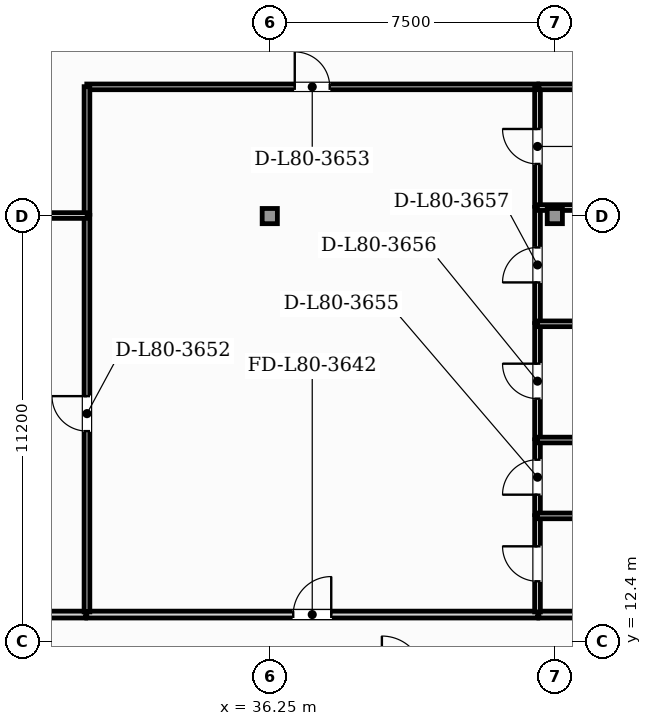
"""IFC4 building model, lengths in metres.
Left out: names, types, materials, properties, quantities, classifications, styles, units other than length and angle.
Written with IfcOpenShell. Run it as: python <this file> out.ifc"""

import sys

from ifc_helpers import new_model, si_unit, direction, frame, frame_2d, origin, origin_2d, place, context, subcontext, project, spatial, rectangle, hollow_rectangle, extrude, element, fill, save


model = new_model("IFC4")
c1 = context("Model", 3, precision=1e-05, world=origin(), true_north=direction((0.0, 1.0)))
c2 = subcontext(c1, "Body", "Model", "MODEL_VIEW")
j1 = project(units=[si_unit("LENGTHUNIT", "METRE"), si_unit("PLANEANGLEUNIT", "RADIAN")], contexts=[c1])
p1 = place(None, origin())
s1 = spatial("IfcSite", under=j1, at=p1, CompositionType="ELEMENT")
p2 = place(p1, origin())
s2 = spatial("IfcBuilding", under=s1, at=p2, CompositionType="ELEMENT")
p3 = place(p2, frame((0.0, 0.0, 324.6)))
s3 = spatial("IfcBuildingStorey", under=s2, at=p3, CompositionType="ELEMENT", Elevation=324.6)
for number, where, z_axis, x_axis in (
    (1, (36.25, 23.6, 0.0), (0.0, 0.0, 1.0), (1.0, 0.0, 0.0)),
    (2, (43.75, 23.6, 0.0), (0.0, 0.0, 1.0), (1.0, 0.0, 0.0)),
):
    element("IfcColumn", number, at=place(p3, frame(where, z_axis=z_axis, x_axis=x_axis)), inside=s3, PredefinedType="COLUMN", context=c2, shape_type="SweptSolid", body=[
        extrude(hollow_rectangle(XDim=0.4, YDim=0.4, WallThickness=0.02, at=origin_2d()), origin(), (0.0, 0.0, 1.0), 3.85),
    ])
p4 = place(p3, frame((31.435, 13.115, 0.0), z_axis=(0.0, 0.0, 1.0), x_axis=(1.0, 0.0, 0.0)))
e3 = element("IfcWall", 3, at=p4, inside=s3, PredefinedType="PARTITIONING", context=c2, shape_type="SweptSolid", body=[
    extrude(rectangle(XDim=11.865, YDim=0.18, at=frame_2d((5.932, 0.0))), origin(), (0.0, 0.0, 1.0), 3.65),
])
p5 = place(p4, frame((5.432, 0.0, 0.0)))
e4 = element("IfcOpeningElement", 4, at=p5, cuts=e3, PredefinedType="OPENING", context=c2, shape_type="SweptSolid", body=[
    extrude(rectangle(XDim=1.0, YDim=2.15, at=frame_2d((0.5, 1.075))), frame((0.0, 0.1, 0.0), z_axis=(0.0, -1.0, 0.0), x_axis=(1.0, 0.0, 0.0)), (0.0, 0.0, 1.0), 0.2),
])
p6 = place(p3, frame((26.095, 13.115, 0.0), z_axis=(0.0, 0.0, 1.0), x_axis=(1.0, 0.0, 0.0)))
e5 = element("IfcWall", 5, at=p6, inside=s3, PredefinedType="PARTITIONING", context=c2, shape_type="SweptSolid", body=[
    extrude(rectangle(XDim=5.31, YDim=0.18, at=frame_2d((2.655, 0.0))), origin(), (0.0, 0.0, 1.0), 3.65),
])
p7 = place(p6, frame((2.155, 0.0, 0.0)))
e6 = element("IfcOpeningElement", 6, at=p7, cuts=e5, PredefinedType="OPENING", context=c2, shape_type="SweptSolid", body=[
    extrude(rectangle(XDim=1.0, YDim=2.15, at=frame_2d((0.5, 1.075))), frame((0.0, 0.1, 0.0), z_axis=(0.0, -1.0, 0.0), x_axis=(1.0, 0.0, 0.0)), (0.0, 0.0, 1.0), 0.2),
])
p8 = place(p3, frame((43.33, 13.115, 0.0), z_axis=(0.0, 0.0, 1.0), x_axis=(1.0, 0.0, 0.0)))
e7 = element("IfcWall", 7, at=p8, inside=s3, PredefinedType="PARTITIONING", context=c2, shape_type="SweptSolid", body=[
    extrude(rectangle(XDim=3.065, YDim=0.18, at=frame_2d((1.533, 0.0))), origin(), (0.0, 0.0, 1.0), 3.65),
])
p9 = place(p3, frame((31.44, 13.185, 0.0), z_axis=(0.0, 0.0, 1.0), x_axis=(0.0, 1.0, 0.0)))
e8 = element("IfcWall", 8, at=p9, inside=s3, PredefinedType="PARTITIONING", context=c2, shape_type="SweptSolid", body=[
    extrude(rectangle(XDim=10.435, YDim=0.15, at=frame_2d((5.217, 0.0))), origin(), (0.0, 0.0, 1.0), 3.65),
])
p10 = place(p9, frame((4.757, 0.0, 0.0)))
e9 = element("IfcOpeningElement", 9, at=p10, cuts=e8, PredefinedType="OPENING", context=c2, shape_type="SweptSolid", body=[
    extrude(rectangle(XDim=0.92, YDim=2.1, at=frame_2d((0.46, 1.05))), frame((0.0, 0.085, 0.0), z_axis=(0.0, -1.0, 0.0), x_axis=(1.0, 0.0, 0.0)), (0.0, 0.0, 1.0), 0.17),
])
p11 = place(p3, frame((31.435, 27.0, 0.0), z_axis=(0.0, 0.0, 1.0), x_axis=(1.0, 0.0, 0.0)))
e10 = element("IfcWall", 10, at=p11, inside=s3, PredefinedType="PARTITIONING", context=c2, shape_type="SweptSolid", body=[
    extrude(rectangle(XDim=11.865, YDim=0.15, at=frame_2d((5.932, 0.0))), origin(), (0.0, 0.0, 1.0), 3.65),
])
p12 = place(p11, frame((5.472, 0.0, 0.0)))
e11 = element("IfcOpeningElement", 11, at=p12, cuts=e10, PredefinedType="OPENING", context=c2, shape_type="SweptSolid", body=[
    extrude(rectangle(XDim=0.92, YDim=2.1, at=frame_2d((0.46, 1.05))), frame((0.0, 0.085, 0.0), z_axis=(0.0, -1.0, 0.0), x_axis=(1.0, 0.0, 0.0)), (0.0, 0.0, 1.0), 0.17),
])
p13 = place(p3, frame((31.44, 23.65, 0.0), z_axis=(0.0, 0.0, 1.0), x_axis=(0.0, 1.0, 0.0)))
e12 = element("IfcWall", 12, at=p13, inside=s3, PredefinedType="PARTITIONING", context=c2, shape_type="SweptSolid", body=[
    extrude(rectangle(XDim=3.355, YDim=0.15, at=frame_2d((1.678, 0.0))), origin(), (0.0, 0.0, 1.0), 3.65),
])
p14 = place(p3, frame((43.295, 13.185, 0.0), z_axis=(0.0, 0.0, 1.0), x_axis=(0.0, 1.0, 0.0)))
e13 = element("IfcWall", 13, at=p14, inside=s3, PredefinedType="PARTITIONING", context=c2, shape_type="SweptSolid", body=[
    extrude(rectangle(XDim=2.531, YDim=0.15, at=frame_2d((1.266, 0.0))), origin(), (0.0, 0.0, 1.0), 3.65),
])
p15 = place(p14, frame((0.806, 0.0, 0.0)))
e14 = element("IfcOpeningElement", 14, at=p15, cuts=e13, PredefinedType="OPENING", context=c2, shape_type="SweptSolid", body=[
    extrude(rectangle(XDim=0.92, YDim=2.1, at=frame_2d((0.46, 1.05))), frame((0.0, 0.085, 0.0), z_axis=(0.0, -1.0, 0.0), x_axis=(1.0, 0.0, 0.0)), (0.0, 0.0, 1.0), 0.17),
])
p16 = place(p3, frame((43.295, 15.747, 0.0), z_axis=(0.0, 0.0, 1.0), x_axis=(0.0, 1.0, 0.0)))
e15 = element("IfcWall", 15, at=p16, inside=s3, PredefinedType="PARTITIONING", context=c2, shape_type="SweptSolid", body=[
    extrude(rectangle(XDim=1.966, YDim=0.15, at=frame_2d((0.983, 0.0))), origin(), (0.0, 0.0, 1.0), 3.65),
])
p17 = place(p16, frame((0.523, 0.0, 0.0)))
e16 = element("IfcOpeningElement", 16, at=p17, cuts=e15, PredefinedType="OPENING", context=c2, shape_type="SweptSolid", body=[
    extrude(rectangle(XDim=0.92, YDim=2.1, at=frame_2d((0.46, 1.05))), frame((0.0, 0.085, 0.0), z_axis=(0.0, -1.0, 0.0), x_axis=(1.0, 0.0, 0.0)), (0.0, 0.0, 1.0), 0.17),
])
p18 = place(p3, frame((43.295, 17.743, 0.0), z_axis=(0.0, 0.0, 1.0), x_axis=(0.0, 1.0, 0.0)))
e17 = element("IfcWall", 17, at=p18, inside=s3, PredefinedType="PARTITIONING", context=c2, shape_type="SweptSolid", body=[
    extrude(rectangle(XDim=3.028, YDim=0.15, at=frame_2d((1.514, 0.0))), origin(), (0.0, 0.0, 1.0), 3.65),
])
p19 = place(p18, frame((1.054, 0.0, 0.0)))
e18 = element("IfcOpeningElement", 18, at=p19, cuts=e17, PredefinedType="OPENING", context=c2, shape_type="SweptSolid", body=[
    extrude(rectangle(XDim=0.92, YDim=2.1, at=frame_2d((0.46, 1.05))), frame((0.0, 0.085, 0.0), z_axis=(0.0, -1.0, 0.0), x_axis=(1.0, 0.0, 0.0)), (0.0, 0.0, 1.0), 0.17),
])
p20 = place(p3, frame((43.295, 20.801, 0.0), z_axis=(0.0, 0.0, 1.0), x_axis=(0.0, 1.0, 0.0)))
e19 = element("IfcWall", 19, at=p20, inside=s3, PredefinedType="PARTITIONING", context=c2, shape_type="SweptSolid", body=[
    extrude(rectangle(XDim=3.028, YDim=0.15, at=frame_2d((1.514, 0.0))), origin(), (0.0, 0.0, 1.0), 3.65),
])
p21 = place(p20, frame((1.054, 0.0, 0.0)))
e20 = element("IfcOpeningElement", 20, at=p21, cuts=e19, PredefinedType="OPENING", context=c2, shape_type="SweptSolid", body=[
    extrude(rectangle(XDim=0.92, YDim=2.1, at=frame_2d((0.46, 1.05))), frame((0.0, 0.085, 0.0), z_axis=(0.0, -1.0, 0.0), x_axis=(1.0, 0.0, 0.0)), (0.0, 0.0, 1.0), 0.17),
])
p22 = place(p3, frame((43.295, 23.859, 0.0), z_axis=(0.0, 0.0, 1.0), x_axis=(0.0, 1.0, 0.0)))
e21 = element("IfcWall", 21, at=p22, inside=s3, PredefinedType="PARTITIONING", context=c2, shape_type="SweptSolid", body=[
    extrude(rectangle(XDim=3.146, YDim=0.15, at=frame_2d((1.573, 0.0))), origin(), (0.0, 0.0, 1.0), 3.65),
])
p23 = place(p22, frame((1.113, 0.0, 0.0)))
e22 = element("IfcOpeningElement", 22, at=p23, cuts=e21, PredefinedType="OPENING", context=c2, shape_type="SweptSolid", body=[
    extrude(rectangle(XDim=0.92, YDim=2.1, at=frame_2d((0.46, 1.05))), frame((0.0, 0.085, 0.0), z_axis=(0.0, -1.0, 0.0), x_axis=(1.0, 0.0, 0.0)), (0.0, 0.0, 1.0), 0.17),
])
p24 = place(p3, frame((26.055, 23.615, 0.0), z_axis=(0.0, 0.0, 1.0), x_axis=(1.0, 0.0, 0.0)))
e23 = element("IfcWall", 23, at=p24, inside=s3, PredefinedType="PARTITIONING", context=c2, shape_type="SweptSolid", body=[
    extrude(rectangle(XDim=5.39, YDim=0.15, at=frame_2d((2.695, 0.0))), origin(), (0.0, 0.0, 1.0), 3.117),
])
p25 = place(p24, frame((0.618, 0.0, 0.0)))
e24 = element("IfcOpeningElement", 24, at=p25, cuts=e23, PredefinedType="OPENING", context=c2, shape_type="SweptSolid", body=[
    extrude(rectangle(XDim=0.92, YDim=2.1, at=frame_2d((0.46, 1.05))), frame((0.0, 0.085, 0.0), z_axis=(0.0, -1.0, 0.0), x_axis=(1.0, 0.0, 0.0)), (0.0, 0.0, 1.0), 0.17),
])
p26 = place(p3, frame((43.33, 27.0, 0.0), z_axis=(0.0, 0.0, 1.0), x_axis=(1.0, 0.0, 0.0)))
e25 = element("IfcWall", 25, at=p26, inside=s3, PredefinedType="PARTITIONING", context=c2, shape_type="SweptSolid", body=[
    extrude(rectangle(XDim=4.885, YDim=0.15, at=frame_2d((2.443, 0.0))), origin(), (0.0, 0.0, 1.0), 3.65),
])
p27 = place(p26, frame((1.983, 0.0, 0.0)))
e26 = element("IfcOpeningElement", 26, at=p27, cuts=e25, PredefinedType="OPENING", context=c2, shape_type="SweptSolid", body=[
    extrude(rectangle(XDim=0.92, YDim=2.1, at=frame_2d((0.46, 1.05))), frame((0.0, 0.085, 0.0), z_axis=(0.0, -1.0, 0.0), x_axis=(1.0, 0.0, 0.0)), (0.0, 0.0, 1.0), 0.17),
])
for number, where, z_axis, x_axis in (
    (27, (43.29, 15.711, 0.0), (0.0, 0.0, 1.0), (1.0, 0.0, 0.0)),
    (28, (43.29, 17.708, 0.0), (0.0, 0.0, 1.0), (1.0, 0.0, 0.0)),
    (29, (43.29, 20.766, 0.0), (0.0, 0.0, 1.0), (1.0, 0.0, 0.0)),
    (30, (43.29, 23.823, 0.0), (0.0, 0.0, 1.0), (1.0, 0.0, 0.0)),
):
    element("IfcWall", number, at=place(p3, frame(where, z_axis=z_axis, x_axis=x_axis)), inside=s3, PredefinedType="PARTITIONING", context=c2, shape_type="SweptSolid", body=[
        extrude(rectangle(XDim=4.926, YDim=0.15, at=frame_2d((2.463, 0.0))), origin(), (0.0, 0.0, 1.0), 3.65),
    ])
p28 = place(p5, origin())
e31 = element("IfcDoor", 31, at=p28, inside=s3, OperationType="SINGLE_SWING_RIGHT", PredefinedType="DOOR", context=c2, shape_type="SweptSolid", body=[
    extrude(rectangle(XDim=1.0, YDim=2.15, at=frame_2d((0.5, 1.075))), frame((0.0, 0.025, 0.0), z_axis=(0.0, -1.0, 0.0), x_axis=(1.0, 0.0, 0.0)), (0.0, 0.0, 1.0), 0.05),
])
fill(e4, e31)
p29 = place(p10, origin())
e32 = element("IfcDoor", 32, at=p29, inside=s3, OperationType="SINGLE_SWING_RIGHT", PredefinedType="DOOR", context=c2, shape_type="SweptSolid", body=[
    extrude(rectangle(XDim=0.92, YDim=2.1, at=frame_2d((0.46, 1.05))), frame((0.0, 0.025, 0.0), z_axis=(0.0, -1.0, 0.0), x_axis=(1.0, 0.0, 0.0)), (0.0, 0.0, 1.0), 0.05),
])
fill(e9, e32)
p30 = place(p12, origin())
e33 = element("IfcDoor", 33, at=p30, inside=s3, OperationType="SINGLE_SWING_LEFT", PredefinedType="DOOR", context=c2, shape_type="SweptSolid", body=[
    extrude(rectangle(XDim=0.92, YDim=2.1, at=frame_2d((0.46, 1.05))), frame((0.0, 0.025, 0.0), z_axis=(0.0, -1.0, 0.0), x_axis=(1.0, 0.0, 0.0)), (0.0, 0.0, 1.0), 0.05),
])
fill(e11, e33)
p31 = place(p15, origin())
e34 = element("IfcDoor", 34, at=p31, inside=s3, OperationType="SINGLE_SWING_RIGHT", PredefinedType="DOOR", context=c2, shape_type="SweptSolid", body=[
    extrude(rectangle(XDim=0.92, YDim=2.1, at=frame_2d((0.46, 1.05))), frame((0.0, 0.025, 0.0), z_axis=(0.0, -1.0, 0.0), x_axis=(1.0, 0.0, 0.0)), (0.0, 0.0, 1.0), 0.05),
])
fill(e14, e34)
p32 = place(p17, origin())
e35 = element("IfcDoor", 35, at=p32, inside=s3, OperationType="SINGLE_SWING_LEFT", PredefinedType="DOOR", context=c2, shape_type="SweptSolid", body=[
    extrude(rectangle(XDim=0.92, YDim=2.1, at=frame_2d((0.46, 1.05))), frame((0.0, 0.025, 0.0), z_axis=(0.0, -1.0, 0.0), x_axis=(1.0, 0.0, 0.0)), (0.0, 0.0, 1.0), 0.05),
])
fill(e16, e35)
p33 = place(p19, origin())
e36 = element("IfcDoor", 36, at=p33, inside=s3, OperationType="SINGLE_SWING_RIGHT", PredefinedType="DOOR", context=c2, shape_type="SweptSolid", body=[
    extrude(rectangle(XDim=0.92, YDim=2.1, at=frame_2d((0.46, 1.05))), frame((0.0, 0.025, 0.0), z_axis=(0.0, -1.0, 0.0), x_axis=(1.0, 0.0, 0.0)), (0.0, 0.0, 1.0), 0.05),
])
fill(e18, e36)
p34 = place(p21, origin())
e37 = element("IfcDoor", 37, at=p34, inside=s3, OperationType="SINGLE_SWING_LEFT", PredefinedType="DOOR", context=c2, shape_type="SweptSolid", body=[
    extrude(rectangle(XDim=0.92, YDim=2.1, at=frame_2d((0.46, 1.05))), frame((0.0, 0.025, 0.0), z_axis=(0.0, -1.0, 0.0), x_axis=(1.0, 0.0, 0.0)), (0.0, 0.0, 1.0), 0.05),
])
fill(e20, e37)
p35 = place(p23, origin())
e38 = element("IfcDoor", 38, at=p35, inside=s3, OperationType="SINGLE_SWING_RIGHT", PredefinedType="DOOR", context=c2, shape_type="SweptSolid", body=[
    extrude(rectangle(XDim=0.92, YDim=2.1, at=frame_2d((0.46, 1.05))), frame((0.0, 0.025, 0.0), z_axis=(0.0, -1.0, 0.0), x_axis=(1.0, 0.0, 0.0)), (0.0, 0.0, 1.0), 0.05),
])
fill(e22, e38)
save(model, sys.argv[1])
